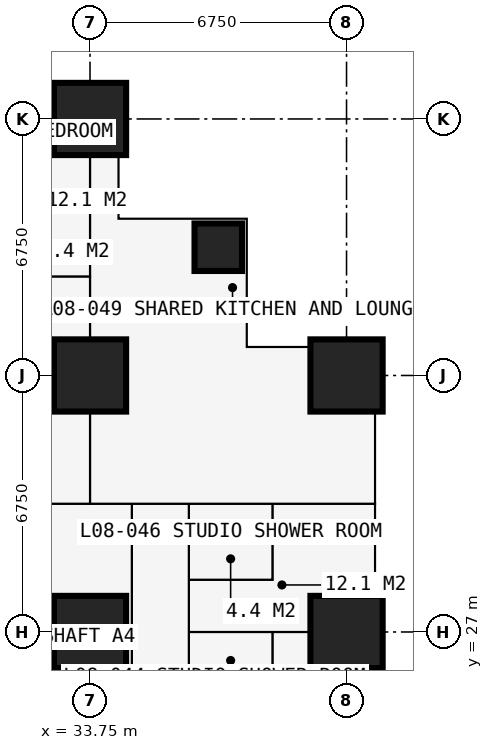
"""IFC4 building model, lengths in metres.
Left out: names, types, materials, properties, quantities, classifications, styles, units other than length and angle.
Written with IfcOpenShell. Run it as: python <this file> out.ifc"""

import sys

from ifc_helpers import new_model, si_unit, direction, frame, frame_2d, origin, origin_2d, place, context, subcontext, project, spatial, rectangle, extrude, element, fill, save


model = new_model("IFC4")
c1 = context("Model", 3, precision=1e-05, world=origin(), true_north=direction((0.0, 1.0)))
c2 = subcontext(c1, "Body", "Model", "MODEL_VIEW")
j1 = project(units=[si_unit("LENGTHUNIT", "METRE"), si_unit("PLANEANGLEUNIT", "RADIAN")], contexts=[c1])
p1 = place(None, origin())
s1 = spatial("IfcSite", under=j1, at=p1, CompositionType="ELEMENT")
p2 = place(p1, origin())
s2 = spatial("IfcBuilding", under=s1, at=p2, CompositionType="ELEMENT")
p3 = place(p2, frame((0.0, 0.0, 32.4)))
s3 = spatial("IfcBuildingStorey", under=s2, at=p3, CompositionType="ELEMENT", Elevation=32.4)
for number, where, z_axis, x_axis in (
    (1, (33.75, 27.0, 0.0), (0.0, 0.0, 1.0), (1.0, 0.0, 0.0)),
    (2, (33.75, 33.75, 0.0), (0.0, 0.0, 1.0), (1.0, 0.0, 0.0)),
    (3, (33.75, 40.5, 0.0), (0.0, 0.0, 1.0), (1.0, 0.0, 0.0)),
):
    element("IfcColumn", number, at=place(p3, frame(where, z_axis=z_axis, x_axis=x_axis)), inside=s3, PredefinedType="COLUMN", context=c2, shape_type="SweptSolid", body=[
        extrude(rectangle(XDim=1.9, YDim=1.9, at=origin_2d()), origin(), (0.0, 0.0, 1.0), 3.6),
    ])
p4 = place(p3, frame((37.125, 37.125, 0.0), z_axis=(0.0, 0.0, 1.0), x_axis=(1.0, 0.0, 0.0)))
e4 = element("IfcColumn", 4, at=p4, inside=s3, PredefinedType="COLUMN", context=c2, shape_type="SweptSolid", body=[
    extrude(rectangle(XDim=1.25, YDim=1.25, at=origin_2d()), origin(), (0.0, 0.0, 1.0), 3.6),
])
for number, where, z_axis, x_axis in (
    (5, (40.5, 27.0, 0.0), (0.0, 0.0, 1.0), (1.0, 0.0, 0.0)),
    (6, (40.5, 33.75, 0.0), (0.0, 0.0, 1.0), (1.0, 0.0, 0.0)),
):
    element("IfcColumn", number, at=place(p3, frame(where, z_axis=z_axis, x_axis=x_axis)), inside=s3, PredefinedType="COLUMN", context=c2, shape_type="SweptSolid", body=[
        extrude(rectangle(XDim=1.9, YDim=1.9, at=origin_2d()), origin(), (0.0, 0.0, 1.0), 3.6),
    ])
p5 = place(p3, frame((41.25, 34.5, 0.0), z_axis=(0.0, 0.0, 1.0), x_axis=(-1.0, 0.0, 0.0)))
e7 = element("IfcWall", 7, at=p5, inside=s3, PredefinedType="SOLIDWALL", context=c2, shape_type="SweptSolid", body=[
    extrude(rectangle(XDim=3.375, YDim=0.3, at=frame_2d((1.688, 0.0))), origin(), (0.0, 0.0, 1.0), 3.375),
])
p6 = place(p5, frame((1.857, 0.0, 0.9)))
e8 = element("IfcOpeningElement", 8, at=p6, cuts=e7, PredefinedType="OPENING", context=c2, shape_type="SweptSolid", body=[
    extrude(rectangle(XDim=1.2, YDim=1.8, at=frame_2d((0.6, 0.9))), frame((0.0, 0.16, 0.0), z_axis=(0.0, -1.0, 0.0), x_axis=(1.0, 0.0, 0.0)), (0.0, 0.0, 1.0), 0.32),
])
p7 = place(p3, frame((37.875, 34.5, 0.0), z_axis=(0.0, 0.0, 1.0), x_axis=(0.0, 1.0, 0.0)))
e9 = element("IfcWall", 9, at=p7, inside=s3, PredefinedType="SOLIDWALL", context=c2, shape_type="SweptSolid", body=[
    extrude(rectangle(XDim=3.375, YDim=0.3, at=frame_2d((1.688, 0.0))), origin(), (0.0, 0.0, 1.0), 3.375),
])
p8 = place(p7, frame((0.788, 0.0, 0.6)))
e10 = element("IfcOpeningElement", 10, at=p8, cuts=e9, PredefinedType="OPENING", context=c2, shape_type="SweptSolid", body=[
    extrude(rectangle(XDim=1.8, YDim=2.1, at=frame_2d((0.9, 1.05))), frame((0.0, 0.16, 0.0), z_axis=(0.0, -1.0, 0.0), x_axis=(1.0, 0.0, 0.0)), (0.0, 0.0, 1.0), 0.32),
])
p9 = place(p3, frame((37.875, 37.875, 0.0), z_axis=(0.0, 0.0, 1.0), x_axis=(-1.0, 0.0, 0.0)))
e11 = element("IfcWall", 11, at=p9, inside=s3, PredefinedType="SOLIDWALL", context=c2, shape_type="SweptSolid", body=[
    extrude(rectangle(XDim=3.375, YDim=0.3, at=frame_2d((1.688, 0.0))), origin(), (0.0, 0.0, 1.0), 3.375),
])
p10 = place(p9, frame((0.788, 0.0, 0.6)))
e12 = element("IfcOpeningElement", 12, at=p10, cuts=e11, PredefinedType="OPENING", context=c2, shape_type="SweptSolid", body=[
    extrude(rectangle(XDim=1.8, YDim=2.1, at=frame_2d((0.9, 1.05))), frame((0.0, 0.16, 0.0), z_axis=(0.0, -1.0, 0.0), x_axis=(1.0, 0.0, 0.0)), (0.0, 0.0, 1.0), 0.32),
])
p11 = place(p3, frame((34.5, 37.875, 0.0), z_axis=(0.0, 0.0, 1.0), x_axis=(0.0, 1.0, 0.0)))
e13 = element("IfcWall", 13, at=p11, inside=s3, PredefinedType="SOLIDWALL", context=c2, shape_type="SweptSolid", body=[
    extrude(rectangle(XDim=3.375, YDim=0.3, at=frame_2d((1.688, 0.0))), origin(), (0.0, 0.0, 1.0), 3.375),
])
p12 = place(p11, frame((0.317, 0.0, 0.9)))
e14 = element("IfcOpeningElement", 14, at=p12, cuts=e13, PredefinedType="OPENING", context=c2, shape_type="SweptSolid", body=[
    extrude(rectangle(XDim=1.2, YDim=1.8, at=frame_2d((0.6, 0.9))), frame((0.0, 0.16, 0.0), z_axis=(0.0, -1.0, 0.0), x_axis=(1.0, 0.0, 0.0)), (0.0, 0.0, 1.0), 0.32),
])
p13 = place(p3, frame((10.125, 36.35, 0.0), z_axis=(0.0, 0.0, 1.0), x_axis=(1.0, 0.0, 0.0)))
e15 = element("IfcWall", 15, at=p13, inside=s3, PredefinedType="PARTITIONING", context=c2, shape_type="SweptSolid", body=[
    extrude(rectangle(XDim=23.625, YDim=0.1, at=frame_2d((11.812, 0.0))), origin(), (0.0, 0.0, 1.0), 3.375),
])
p14 = place(p13, frame((20.5, 0.0, 0.0)))
e16 = element("IfcOpeningElement", 16, at=p14, cuts=e15, PredefinedType="OPENING", context=c2, shape_type="SweptSolid", body=[
    extrude(rectangle(XDim=0.95, YDim=2.2, at=frame_2d((0.475, 1.1))), frame((0.0, 0.06, 0.0), z_axis=(0.0, -1.0, 0.0), x_axis=(1.0, 0.0, 0.0)), (0.0, 0.0, 1.0), 0.12),
])
p15 = place(p13, frame((17.125, 0.0, 0.0)))
e17 = element("IfcOpeningElement", 17, at=p15, cuts=e15, PredefinedType="OPENING", context=c2, shape_type="SweptSolid", body=[
    extrude(rectangle(XDim=0.95, YDim=2.2, at=frame_2d((0.475, 1.1))), frame((0.0, 0.06, 0.0), z_axis=(0.0, -1.0, 0.0), x_axis=(1.0, 0.0, 0.0)), (0.0, 0.0, 1.0), 0.12),
])
p16 = place(p13, frame((13.7, 0.0, 0.0)))
e18 = element("IfcOpeningElement", 18, at=p16, cuts=e15, PredefinedType="OPENING", context=c2, shape_type="SweptSolid", body=[
    extrude(rectangle(XDim=0.95, YDim=2.2, at=frame_2d((0.475, 1.1))), frame((0.0, 0.06, 0.0), z_axis=(0.0, -1.0, 0.0), x_axis=(1.0, 0.0, 0.0)), (0.0, 0.0, 1.0), 0.12),
])
p17 = place(p13, frame((0.2, 0.0, 0.0)))
e19 = element("IfcOpeningElement", 19, at=p17, cuts=e15, PredefinedType="OPENING", context=c2, shape_type="SweptSolid", body=[
    extrude(rectangle(XDim=0.95, YDim=2.2, at=frame_2d((0.475, 1.1))), frame((0.0, 0.06, 0.0), z_axis=(0.0, -1.0, 0.0), x_axis=(1.0, 0.0, 0.0)), (0.0, 0.0, 1.0), 0.12),
])
p18 = place(p13, frame((3.625, 0.0, 0.0)))
e20 = element("IfcOpeningElement", 20, at=p18, cuts=e15, PredefinedType="OPENING", context=c2, shape_type="SweptSolid", body=[
    extrude(rectangle(XDim=0.95, YDim=2.2, at=frame_2d((0.475, 1.1))), frame((0.0, 0.06, 0.0), z_axis=(0.0, -1.0, 0.0), x_axis=(1.0, 0.0, 0.0)), (0.0, 0.0, 1.0), 0.12),
])
p19 = place(p13, frame((7.0, 0.0, 0.0)))
e21 = element("IfcOpeningElement", 21, at=p19, cuts=e15, PredefinedType="OPENING", context=c2, shape_type="SweptSolid", body=[
    extrude(rectangle(XDim=0.95, YDim=2.2, at=frame_2d((0.475, 1.1))), frame((0.0, 0.06, 0.0), z_axis=(0.0, -1.0, 0.0), x_axis=(1.0, 0.0, 0.0)), (0.0, 0.0, 1.0), 0.12),
])
p20 = place(p13, frame((10.375, 0.0, 0.0)))
e22 = element("IfcOpeningElement", 22, at=p20, cuts=e15, PredefinedType="OPENING", context=c2, shape_type="SweptSolid", body=[
    extrude(rectangle(XDim=0.95, YDim=2.2, at=frame_2d((0.475, 1.1))), frame((0.0, 0.06, 0.0), z_axis=(0.0, -1.0, 0.0), x_axis=(1.0, 0.0, 0.0)), (0.0, 0.0, 1.0), 0.12),
])
p21 = place(p3, frame((30.375, 30.375, 0.0), z_axis=(0.0, 0.0, 1.0), x_axis=(1.0, 0.0, 0.0)))
e23 = element("IfcWall", 23, at=p21, inside=s3, PredefinedType="PARTITIONING", context=c2, shape_type="SweptSolid", body=[
    extrude(rectangle(XDim=10.859, YDim=0.15, at=frame_2d((5.429, 0.0))), origin(), (0.0, 0.0, 1.0), 3.375),
])
p22 = place(p3, frame((31.75, 38.55, 0.0), z_axis=(0.0, 0.0, 1.0), x_axis=(1.0, 0.0, 0.0)))
e24 = element("IfcWall", 24, at=p22, inside=s3, PredefinedType="PARTITIONING", context=c2, shape_type="SweptSolid", body=[
    extrude(rectangle(XDim=2.0, YDim=0.1, at=frame_2d((1.0, 0.0))), origin(), (0.0, 0.0, 1.0), 3.375),
])
p23 = place(p3, frame((33.75, 30.375, 0.0), z_axis=(0.0, 0.0, 1.0), x_axis=(0.0, 1.0, 0.0)))
e25 = element("IfcWall", 25, at=p23, inside=s3, PredefinedType="PARTITIONING", context=c2, shape_type="SweptSolid", body=[
    extrude(rectangle(XDim=10.859, YDim=0.15, at=frame_2d((5.429, 0.0))), origin(), (0.0, 0.0, 1.0), 2.877),
])
p24 = place(p23, frame((1.4, 0.0, 0.0)))
e26 = element("IfcOpeningElement", 26, at=p24, cuts=e25, PredefinedType="OPENING", context=c2, shape_type="SweptSolid", body=[
    extrude(rectangle(XDim=1.0, YDim=2.2, at=frame_2d((0.5, 1.1))), frame((0.0, 0.085, 0.0), z_axis=(0.0, -1.0, 0.0), x_axis=(1.0, 0.0, 0.0)), (0.0, 0.0, 1.0), 0.17),
])
p25 = place(p3, frame((34.85, 12.55, 0.0), z_axis=(0.0, 0.0, 1.0), x_axis=(0.0, 1.0, 0.0)))
e27 = element("IfcWall", 27, at=p25, inside=s3, PredefinedType="PARTITIONING", context=c2, shape_type="SweptSolid", body=[
    extrude(rectangle(XDim=17.825, YDim=0.15, at=frame_2d((8.913, 0.0))), origin(), (0.0, 0.0, 1.0), 3.375),
])
p26 = place(p25, frame((8.65, 0.0, 0.0)))
e28 = element("IfcOpeningElement", 28, at=p26, cuts=e27, PredefinedType="OPENING", context=c2, shape_type="SweptSolid", body=[
    extrude(rectangle(XDim=0.95, YDim=2.2, at=frame_2d((0.475, 1.1))), frame((0.0, 0.085, 0.0), z_axis=(0.0, -1.0, 0.0), x_axis=(1.0, 0.0, 0.0)), (0.0, 0.0, 1.0), 0.17),
])
p27 = place(p3, frame((36.35, 6.75, 0.0), z_axis=(0.0, 0.0, 1.0), x_axis=(0.0, 1.0, 0.0)))
e29 = element("IfcWall", 29, at=p27, inside=s3, PredefinedType="PARTITIONING", context=c2, shape_type="SweptSolid", body=[
    extrude(rectangle(XDim=23.625, YDim=0.1, at=frame_2d((11.812, 0.0))), origin(), (0.0, 0.0, 1.0), 3.375),
])
p28 = place(p27, frame((0.2, 0.0, 0.0)))
e30 = element("IfcOpeningElement", 30, at=p28, cuts=e29, PredefinedType="OPENING", context=c2, shape_type="SweptSolid", body=[
    extrude(rectangle(XDim=0.95, YDim=2.2, at=frame_2d((0.475, 1.1))), frame((0.0, 0.06, 0.0), z_axis=(0.0, -1.0, 0.0), x_axis=(1.0, 0.0, 0.0)), (0.0, 0.0, 1.0), 0.12),
])
p29 = place(p27, frame((3.575, 0.0, 0.0)))
e31 = element("IfcOpeningElement", 31, at=p29, cuts=e29, PredefinedType="OPENING", context=c2, shape_type="SweptSolid", body=[
    extrude(rectangle(XDim=0.95, YDim=2.2, at=frame_2d((0.475, 1.1))), frame((0.0, 0.06, 0.0), z_axis=(0.0, -1.0, 0.0), x_axis=(1.0, 0.0, 0.0)), (0.0, 0.0, 1.0), 0.12),
])
p30 = place(p27, frame((7.0, 0.0, 0.0)))
e32 = element("IfcOpeningElement", 32, at=p30, cuts=e29, PredefinedType="OPENING", context=c2, shape_type="SweptSolid", body=[
    extrude(rectangle(XDim=0.95, YDim=2.2, at=frame_2d((0.475, 1.1))), frame((0.0, 0.06, 0.0), z_axis=(0.0, -1.0, 0.0), x_axis=(1.0, 0.0, 0.0)), (0.0, 0.0, 1.0), 0.12),
])
p31 = place(p27, frame((10.375, 0.0, 0.0)))
e33 = element("IfcOpeningElement", 33, at=p31, cuts=e29, PredefinedType="OPENING", context=c2, shape_type="SweptSolid", body=[
    extrude(rectangle(XDim=0.95, YDim=2.2, at=frame_2d((0.475, 1.1))), frame((0.0, 0.06, 0.0), z_axis=(0.0, -1.0, 0.0), x_axis=(1.0, 0.0, 0.0)), (0.0, 0.0, 1.0), 0.12),
])
p32 = place(p27, frame((13.75, 0.0, 0.0)))
e34 = element("IfcOpeningElement", 34, at=p32, cuts=e29, PredefinedType="OPENING", context=c2, shape_type="SweptSolid", body=[
    extrude(rectangle(XDim=0.95, YDim=2.2, at=frame_2d((0.475, 1.1))), frame((0.0, 0.06, 0.0), z_axis=(0.0, -1.0, 0.0), x_axis=(1.0, 0.0, 0.0)), (0.0, 0.0, 1.0), 0.12),
])
p33 = place(p27, frame((17.125, 0.0, 0.0)))
e35 = element("IfcOpeningElement", 35, at=p33, cuts=e29, PredefinedType="OPENING", context=c2, shape_type="SweptSolid", body=[
    extrude(rectangle(XDim=0.95, YDim=2.2, at=frame_2d((0.475, 1.1))), frame((0.0, 0.06, 0.0), z_axis=(0.0, -1.0, 0.0), x_axis=(1.0, 0.0, 0.0)), (0.0, 0.0, 1.0), 0.12),
])
p34 = place(p27, frame((20.5, 0.0, 0.0)))
e36 = element("IfcOpeningElement", 36, at=p34, cuts=e29, PredefinedType="OPENING", context=c2, shape_type="SweptSolid", body=[
    extrude(rectangle(XDim=0.95, YDim=2.2, at=frame_2d((0.475, 1.1))), frame((0.0, 0.06, 0.0), z_axis=(0.0, -1.0, 0.0), x_axis=(1.0, 0.0, 0.0)), (0.0, 0.0, 1.0), 0.12),
])
p35 = place(p3, frame((36.35, 27.0, 0.0), z_axis=(0.0, 0.0, 1.0), x_axis=(1.0, 0.0, 0.0)))
e37 = element("IfcWall", 37, at=p35, inside=s3, PredefinedType="PARTITIONING", context=c2, shape_type="SweptSolid", body=[
    extrude(rectangle(XDim=4.884, YDim=0.175, at=frame_2d((2.442, 0.0))), origin(), (0.0, 0.0, 1.0), 2.61),
])
p36 = place(p3, frame((36.35, 28.375, 0.0), z_axis=(0.0, 0.0, 1.0), x_axis=(1.0, 0.0, 0.0)))
e38 = element("IfcWall", 38, at=p36, inside=s3, PredefinedType="PARTITIONING", context=c2, shape_type="SweptSolid", body=[
    extrude(rectangle(XDim=2.2, YDim=0.1, at=frame_2d((1.1, 0.0))), origin(), (0.0, 0.0, 1.0), 3.375),
])
p37 = place(p36, frame((0.65, 0.0, 0.0)))
e39 = element("IfcOpeningElement", 39, at=p37, cuts=e38, PredefinedType="OPENING", context=c2, shape_type="SweptSolid", body=[
    extrude(rectangle(XDim=0.9, YDim=2.2, at=frame_2d((0.45, 1.1))), frame((0.0, 0.06, 0.0), z_axis=(0.0, -1.0, 0.0), x_axis=(1.0, 0.0, 0.0)), (0.0, 0.0, 1.0), 0.12),
])
for number, where, z_axis, x_axis in (
    (40, (38.55, 25.0, 0.0), (0.0, 0.0, 1.0), (0.0, 1.0, 0.0)),
    (41, (38.55, 28.375, 0.0), (0.0, 0.0, 1.0), (0.0, 1.0, 0.0)),
):
    element("IfcWall", number, at=place(p3, frame(where, z_axis=z_axis, x_axis=x_axis)), inside=s3, PredefinedType="PARTITIONING", context=c2, shape_type="SweptSolid", body=[
        extrude(rectangle(XDim=2.0, YDim=0.1, at=frame_2d((1.0, 0.0))), origin(), (0.0, 0.0, 1.0), 3.375),
    ])
p38 = place(p6, origin())
e42 = element("IfcWindow", 42, at=p38, inside=s3, PartitioningType="SINGLE_PANEL", PredefinedType="WINDOW", context=c2, shape_type="SweptSolid", body=[
    extrude(rectangle(XDim=1.2, YDim=1.8, at=frame_2d((0.6, 0.9))), frame((0.0, 0.03, 0.0), z_axis=(0.0, -1.0, 0.0), x_axis=(1.0, 0.0, 0.0)), (0.0, 0.0, 1.0), 0.06),
])
fill(e8, e42)
p39 = place(p8, origin())
e43 = element("IfcWindow", 43, at=p39, inside=s3, PartitioningType="SINGLE_PANEL", PredefinedType="WINDOW", context=c2, shape_type="SweptSolid", body=[
    extrude(rectangle(XDim=1.8, YDim=2.1, at=frame_2d((0.9, 1.05))), frame((0.0, 0.03, 0.0), z_axis=(0.0, -1.0, 0.0), x_axis=(1.0, 0.0, 0.0)), (0.0, 0.0, 1.0), 0.06),
])
fill(e10, e43)
p40 = place(p10, origin())
e44 = element("IfcWindow", 44, at=p40, inside=s3, PartitioningType="SINGLE_PANEL", PredefinedType="WINDOW", context=c2, shape_type="SweptSolid", body=[
    extrude(rectangle(XDim=1.8, YDim=2.1, at=frame_2d((0.9, 1.05))), frame((0.0, 0.03, 0.0), z_axis=(0.0, -1.0, 0.0), x_axis=(1.0, 0.0, 0.0)), (0.0, 0.0, 1.0), 0.06),
])
fill(e12, e44)
p41 = place(p12, origin())
e45 = element("IfcWindow", 45, at=p41, inside=s3, PartitioningType="SINGLE_PANEL", PredefinedType="WINDOW", context=c2, shape_type="SweptSolid", body=[
    extrude(rectangle(XDim=1.2, YDim=1.8, at=frame_2d((0.6, 0.9))), frame((0.0, 0.03, 0.0), z_axis=(0.0, -1.0, 0.0), x_axis=(1.0, 0.0, 0.0)), (0.0, 0.0, 1.0), 0.06),
])
fill(e14, e45)
p42 = place(p34, origin())
e46 = element("IfcDoor", 46, at=p42, inside=s3, OperationType="SINGLE_SWING_LEFT", PredefinedType="DOOR", context=c2, shape_type="SweptSolid", body=[
    extrude(rectangle(XDim=0.95, YDim=2.2, at=frame_2d((0.475, 1.1))), frame((0.0, 0.025, 0.0), z_axis=(0.0, -1.0, 0.0), x_axis=(1.0, 0.0, 0.0)), (0.0, 0.0, 1.0), 0.05),
])
fill(e36, e46)
p43 = place(p37, origin())
e47 = element("IfcDoor", 47, at=p43, inside=s3, OperationType="SINGLE_SWING_RIGHT", PredefinedType="DOOR", context=c2, shape_type="SweptSolid", body=[
    extrude(rectangle(XDim=0.9, YDim=2.2, at=frame_2d((0.45, 1.1))), frame((0.0, 0.025, 0.0), z_axis=(0.0, -1.0, 0.0), x_axis=(1.0, 0.0, 0.0)), (0.0, 0.0, 1.0), 0.05),
])
fill(e39, e47)
p44 = place(p24, origin())
e48 = element("IfcDoor", 48, at=p44, inside=s3, OperationType="SINGLE_SWING_LEFT", PredefinedType="DOOR", context=c2, shape_type="SweptSolid", body=[
    extrude(rectangle(XDim=1.0, YDim=2.2, at=frame_2d((0.5, 1.1))), frame((0.0, 0.025, 0.0), z_axis=(0.0, -1.0, 0.0), x_axis=(1.0, 0.0, 0.0)), (0.0, 0.0, 1.0), 0.05),
])
fill(e26, e48)
save(model, sys.argv[1])
